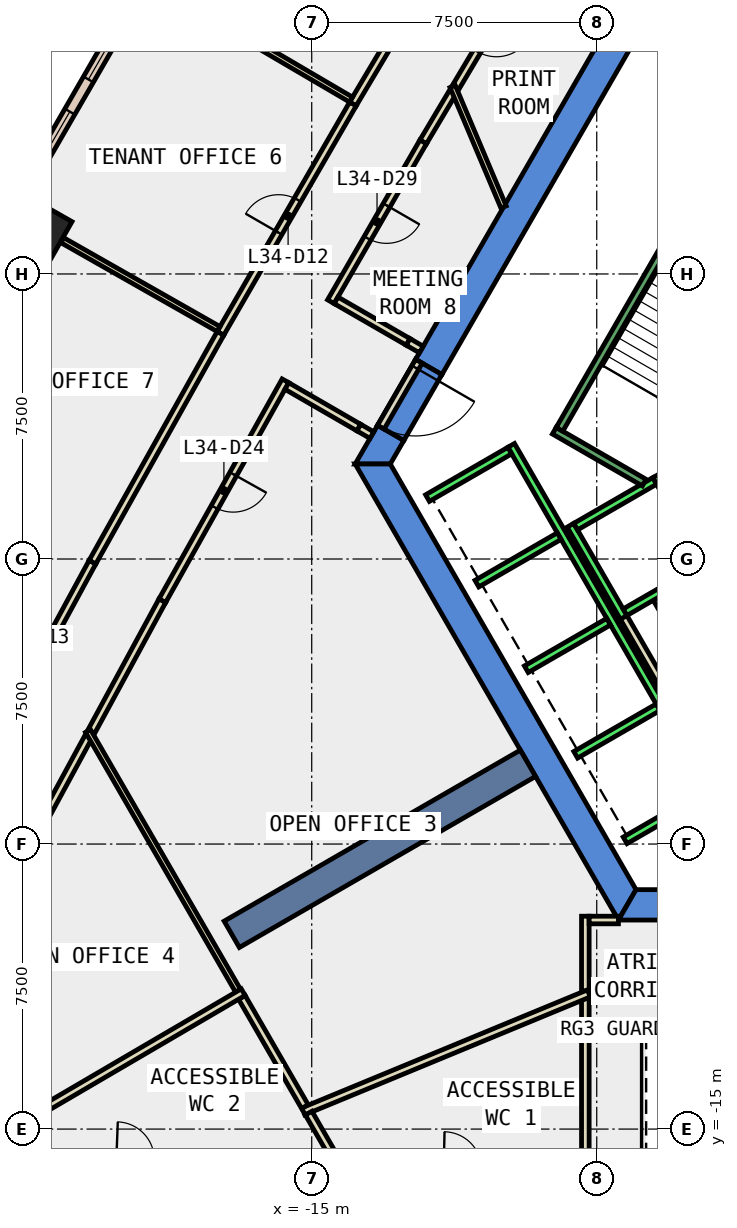
"""IFC4 building model, lengths in metres.
Left out: names, types, materials, properties, quantities, classifications, styles, units other than length and angle.
Written with IfcOpenShell. Run it as: python <this file> out.ifc"""

import sys

from ifc_helpers import new_model, si_unit, direction, frame, frame_2d, origin, origin_2d, place, context, subcontext, project, spatial, polyline, rectangle, outline, extrude, element, fill, save


model = new_model("IFC4")
c1 = context("Model", 3, precision=1e-05, world=origin(), true_north=direction((0.0, 1.0)))
c2 = subcontext(c1, "Body", "Model", "MODEL_VIEW")
j1 = project(units=[si_unit("LENGTHUNIT", "METRE"), si_unit("PLANEANGLEUNIT", "RADIAN")], contexts=[c1])
p1 = place(None, origin())
s1 = spatial("IfcSite", under=j1, at=p1, CompositionType="ELEMENT")
p2 = place(p1, origin())
s2 = spatial("IfcBuilding", under=s1, at=p2, CompositionType="ELEMENT")
p3 = place(p2, frame((0.0, 0.0, 155.0)))
s3 = spatial("IfcBuildingStorey", under=s2, at=p3, CompositionType="ELEMENT", Elevation=155.0)
p4 = place(p3, frame((-22.232, 8.769, -0.4), z_axis=(0.0, 0.0, 1.0), x_axis=(0.49401774245, 0.869451821635, 0.0)))
e1 = element("IfcColumn", 1, at=p4, inside=s3, PredefinedType="COLUMN", context=c2, shape_type="SweptSolid", body=[
    extrude(rectangle(XDim=1.1, YDim=1.5, at=origin_2d()), origin(), (0.0, 0.0, 1.0), 4.2),
])
p5 = place(p3, frame((0.0, 0.0, -0.4)))
e2 = element("IfcWall", 2, at=p5, inside=s3, PredefinedType="SHEAR", context=c2, shape_type="SweptSolid", body=[
    extrude(outline(polyline([(-12.267, 5.252), (-11.575, 4.852), (-6.466, 13.7), (-6.928, 14.5), (-12.267, 5.252)])), origin(), (0.0, 0.0, 1.0), 4.2),
])
p6 = place(p3, frame((0.0, 0.0, -0.4)))
e3 = element("IfcWall", 3, at=p6, inside=s3, PredefinedType="SHEAR", context=c2, shape_type="SweptSolid", body=[
    extrude(outline(polyline([(-12.575, 3.12), (-13.267, 3.52), (-13.856, 2.5), (-12.933, 2.5), (-12.575, 3.12)])), origin(), (0.0, 0.0, 1.0), 4.2),
])
p7 = place(p3, frame((0.0, 0.0, 3.6)))
e4 = element("IfcWall", 4, at=p7, inside=s3, PredefinedType="SHEAR", context=c2, shape_type="SweptSolid", body=[
    extrude(outline(polyline([(-13.267, 3.52), (-12.575, 3.12), (-11.575, 4.852), (-12.267, 5.252), (-13.267, 3.52)])), origin(), (0.0, 0.0, 1.0), 0.2),
])
p8 = place(p3, frame((0.0, 0.0, -0.4)))
e5 = element("IfcWall", 5, at=p8, inside=s3, PredefinedType="SHEAR", context=c2, shape_type="SweptSolid", body=[
    extrude(outline(polyline([(-13.856, 2.5), (-6.928, -9.5), (-6.466, -8.7), (-12.933, 2.5), (-13.856, 2.5)])), origin(), (0.0, 0.0, 1.0), 4.2),
])
p9 = place(p3, frame((0.0, 0.0, -0.4)))
e6 = element("IfcWall", 6, at=p9, inside=s3, PredefinedType="SHEAR", context=c2, shape_type="SweptSolid", body=[
    extrude(outline(polyline([(3.75, -9.5), (3.75, -8.7), (-6.466, -8.7), (-6.928, -9.5), (3.75, -9.5)])), origin(), (0.0, 0.0, 1.0), 4.2),
])
p10 = place(p3, frame((-9.31, -5.375, -0.4), z_axis=(0.0, 0.0, 1.0), x_axis=(-0.866017533419, -0.500013631625, 0.0)))
e7 = element("IfcWall", 7, at=p10, inside=s3, PredefinedType="SHEAR", context=c2, shape_type="SweptSolid", body=[
    extrude(rectangle(XDim=9.0, YDim=0.8, at=frame_2d((4.5, 0.0))), origin(), (0.0, 0.0, 1.0), 4.2),
])
p11 = place(p3, frame((-19.631, 14.774, 0.0), z_axis=(0.0, 0.0, 1.0), x_axis=(-0.500061823953, -0.865989706766, 0.0)))
e8 = element("IfcWall", 8, at=p11, inside=s3, PredefinedType="STANDARD", context=c2, shape_type="SweptSolid", body=[
    extrude(rectangle(XDim=5.957, YDim=0.3, at=frame_2d((2.979, 0.0))), origin(), (0.0, 0.0, 1.0), 3.8),
])
p12 = place(p11, frame((0.489, 0.0, 0.9)))
e9 = element("IfcOpeningElement", 9, at=p12, cuts=e8, PredefinedType="OPENING", context=c2, shape_type="SweptSolid", body=[
    extrude(rectangle(XDim=2.0, YDim=2.6, at=frame_2d((1.0, 1.3))), frame((0.0, 0.16, 0.0), z_axis=(0.0, -1.0, 0.0), x_axis=(1.0, 0.0, 0.0)), (0.0, 0.0, 1.0), 0.32),
])
p13 = place(p11, frame((3.468, 0.0, 0.9)))
e10 = element("IfcOpeningElement", 10, at=p13, cuts=e8, PredefinedType="OPENING", context=c2, shape_type="SweptSolid", body=[
    extrude(rectangle(XDim=2.0, YDim=2.6, at=frame_2d((1.0, 1.3))), frame((0.0, 0.16, 0.0), z_axis=(0.0, -1.0, 0.0), x_axis=(1.0, 0.0, 0.0)), (0.0, 0.0, 1.0), 0.32),
])
p14 = place(p3, frame((-9.574, 15.164, 0.0), z_axis=(0.0, 0.0, 1.0), x_axis=(-0.511482522046, -0.859293680671, 0.0)))
e11 = element("IfcWall", 11, at=p14, inside=s3, PredefinedType="PARTITIONING", context=c2, shape_type="SweptSolid", body=[
    extrude(rectangle(XDim=3.208, YDim=0.2, at=frame_2d((1.604, 0.0))), origin(), (0.0, 0.0, 1.0), 3.8),
])
p15 = place(p14, frame((1.104, 0.0, 0.0)))
e12 = element("IfcOpeningElement", 12, at=p15, cuts=e11, PredefinedType="OPENING", context=c2, shape_type="SweptSolid", body=[
    extrude(rectangle(XDim=1.0, YDim=2.1, at=frame_2d((0.5, 1.05))), frame((0.0, 0.11, 0.0), z_axis=(0.0, -1.0, 0.0), x_axis=(1.0, 0.0, 0.0)), (0.0, 0.0, 1.0), 0.22),
])
p16 = place(p3, frame((-11.291, 12.278, 0.0), z_axis=(0.0, 0.0, 1.0), x_axis=(-0.511628198266, -0.859206952217, 0.0)))
e13 = element("IfcWall", 13, at=p16, inside=s3, PredefinedType="PARTITIONING", context=c2, shape_type="SweptSolid", body=[
    extrude(rectangle(XDim=1.517, YDim=0.2, at=frame_2d((0.758, 0.0))), origin(), (0.0, 0.0, 1.0), 3.8),
])
p17 = place(p3, frame((-12.067, 10.975, 0.0), z_axis=(0.0, 0.0, 1.0), x_axis=(-0.500215616273, -0.865900881878, 0.0)))
e14 = element("IfcWall", 14, at=p17, inside=s3, PredefinedType="PARTITIONING", context=c2, shape_type="SweptSolid", body=[
    extrude(rectangle(XDim=4.856, YDim=0.2, at=frame_2d((2.428, 0.0))), origin(), (0.0, 0.0, 1.0), 3.8),
])
p18 = place(p17, frame((1.928, 0.0, 0.0)))
e15 = element("IfcOpeningElement", 15, at=p18, cuts=e14, PredefinedType="OPENING", context=c2, shape_type="SweptSolid", body=[
    extrude(rectangle(XDim=1.0, YDim=2.1, at=frame_2d((0.5, 1.05))), frame((0.0, 0.11, 0.0), z_axis=(0.0, -1.0, 0.0), x_axis=(1.0, 0.0, 0.0)), (0.0, 0.0, 1.0), 0.22),
])
p19 = place(p3, frame((-14.359, 6.806, 0.0), z_axis=(0.0, 0.0, 1.0), x_axis=(0.866155875717, -0.499773947861, 0.0)))
e16 = element("IfcWall", 16, at=p19, inside=s3, PredefinedType="PARTITIONING", context=c2, shape_type="SweptSolid", body=[
    extrude(rectangle(XDim=2.189, YDim=0.2, at=frame_2d((1.094, 0.0))), origin(), (0.0, 0.0, 1.0), 3.8),
])
p20 = place(p3, frame((-18.93, -1.095, 0.0), z_axis=(0.0, 0.0, 1.0), x_axis=(-0.476854303058, -0.878982351162, 0.0)))
e17 = element("IfcWall", 17, at=p20, inside=s3, PredefinedType="PARTITIONING", context=c2, shape_type="SweptSolid", body=[
    extrude(rectangle(XDim=3.924, YDim=0.2, at=frame_2d((1.962, 0.0))), origin(), (0.0, 0.0, 1.0), 3.8),
])
p21 = place(p3, frame((-13.417, 3.26, 0.0), z_axis=(0.0, 0.0, 1.0), x_axis=(-0.866398669086, 0.499352927503, 0.0)))
e18 = element("IfcWall", 18, at=p21, inside=s3, PredefinedType="PARTITIONING", context=c2, shape_type="SweptSolid", body=[
    extrude(rectangle(XDim=0.4, YDim=0.2, at=frame_2d((0.2, 0.0))), origin(), (0.0, 0.0, 1.0), 2.4),
])
p22 = place(p3, frame((-15.692, 4.689, 0.0), z_axis=(0.0, 0.0, 1.0), x_axis=(-0.48849233301, -0.872568186786, 0.0)))
e19 = element("IfcWall", 19, at=p22, inside=s3, PredefinedType="PARTITIONING", context=c2, shape_type="SweptSolid", body=[
    extrude(rectangle(XDim=6.629, YDim=0.2, at=frame_2d((3.314, 0.0))), origin(), (0.0, 0.0, 1.0), 3.8),
])
p23 = place(p22, frame((2.814, 0.0, 0.0)))
e20 = element("IfcOpeningElement", 20, at=p23, cuts=e19, PredefinedType="OPENING", context=c2, shape_type="SweptSolid", body=[
    extrude(rectangle(XDim=1.0, YDim=2.1, at=frame_2d((0.5, 1.05))), frame((0.0, 0.11, 0.0), z_axis=(0.0, -1.0, 0.0), x_axis=(1.0, 0.0, 0.0)), (0.0, 0.0, 1.0), 0.22),
])
p24 = place(p3, frame((-20.873, -4.676, 0.0), z_axis=(0.0, 0.0, 1.0), x_axis=(-0.476781985736, -0.879021579984, 0.0)))
e21 = element("IfcWall", 21, at=p24, inside=s3, PredefinedType="PARTITIONING", context=c2, shape_type="SweptSolid", body=[
    extrude(rectangle(XDim=2.869, YDim=0.2, at=frame_2d((1.435, 0.0))), origin(), (0.0, 0.0, 1.0), 3.8),
])
p25 = place(p3, frame((-13.917, 11.973, 0.0), z_axis=(0.0, 0.0, 1.0), x_axis=(0.511455840413, 0.859309561978, 0.0)))
e22 = element("IfcWall", 22, at=p25, inside=s3, PredefinedType="PARTITIONING", context=c2, shape_type="SweptSolid", body=[
    extrude(rectangle(XDim=7.047, YDim=0.2, at=frame_2d((3.523, 0.0))), origin(), (0.0, 0.0, 1.0), 3.8),
])
p26 = place(p25, frame((3.023, 0.0, 0.0)))
e23 = element("IfcOpeningElement", 23, at=p26, cuts=e22, PredefinedType="OPENING", context=c2, shape_type="SweptSolid", body=[
    extrude(rectangle(XDim=1.0, YDim=2.1, at=frame_2d((0.5, 1.05))), frame((0.0, 0.11, 0.0), z_axis=(0.0, -1.0, 0.0), x_axis=(1.0, 0.0, 0.0)), (0.0, 0.0, 1.0), 0.22),
])
p27 = place(p3, frame((-17.402, 5.936, 0.0), z_axis=(0.0, 0.0, 1.0), x_axis=(0.500135788517, 0.865946992052, 0.0)))
e24 = element("IfcWall", 24, at=p27, inside=s3, PredefinedType="PARTITIONING", context=c2, shape_type="SweptSolid", body=[
    extrude(rectangle(XDim=6.97, YDim=0.2, at=frame_2d((3.485, 0.0))), origin(), (0.0, 0.0, 1.0), 3.8),
])
p28 = place(p27, frame((3.06, 0.0, 0.0)))
e25 = element("IfcOpeningElement", 25, at=p28, cuts=e24, PredefinedType="OPENING", context=c2, shape_type="SweptSolid", body=[
    extrude(rectangle(XDim=1.0, YDim=2.1, at=frame_2d((0.5, 1.05))), frame((0.0, 0.11, 0.0), z_axis=(0.0, -1.0, 0.0), x_axis=(1.0, 0.0, 0.0)), (0.0, 0.0, 1.0), 0.22),
])
p29 = place(p3, frame((-24.13, -6.275, 0.0), z_axis=(0.0, 0.0, 1.0), x_axis=(0.476981750532, 0.878913198023, 0.0)))
e26 = element("IfcWall", 26, at=p29, inside=s3, PredefinedType="PARTITIONING", context=c2, shape_type="SweptSolid", body=[
    extrude(rectangle(XDim=7.046, YDim=0.2, at=frame_2d((3.523, 0.0))), origin(), (0.0, 0.0, 1.0), 3.8),
])
p30 = place(p29, frame((3.023, 0.0, 0.0)))
e27 = element("IfcOpeningElement", 27, at=p30, cuts=e26, PredefinedType="OPENING", context=c2, shape_type="SweptSolid", body=[
    extrude(rectangle(XDim=1.0, YDim=2.1, at=frame_2d((0.5, 1.05))), frame((0.0, 0.11, 0.0), z_axis=(0.0, -1.0, 0.0), x_axis=(1.0, 0.0, 0.0)), (0.0, 0.0, 1.0), 0.22),
])
p31 = place(p3, frame((-20.769, -0.082, 0.0), z_axis=(0.0, 0.0, 1.0), x_axis=(0.488387759141, 0.872626722443, 0.0)))
e28 = element("IfcWall", 28, at=p31, inside=s3, PredefinedType="PARTITIONING", context=c2, shape_type="SweptSolid", body=[
    extrude(rectangle(XDim=6.896, YDim=0.2, at=frame_2d((3.448, 0.0))), origin(), (0.0, 0.0, 1.0), 3.8),
])
p32 = place(p3, frame((-5.126, -2.422, 0.0), z_axis=(0.0, 0.0, 1.0), x_axis=(-0.500062241894, 0.865989465428, 0.0)))
e29 = element("IfcWall", 29, at=p32, inside=s3, PredefinedType="PARTITIONING", context=c2, shape_type="SweptSolid", body=[
    extrude(rectangle(XDim=1.7, YDim=0.2, at=frame_2d((0.85, 0.0))), origin(), (0.0, 0.0, 1.0), 3.8),
])
p33 = place(p3, frame((-5.492, -3.788, 0.0), z_axis=(0.0, 0.0, 1.0), x_axis=(-0.500008949224, 0.866020236886, 0.0)))
e30 = element("IfcWall", 30, at=p33, inside=s3, PredefinedType="PARTITIONING", context=c2, shape_type="SweptSolid", body=[
    extrude(rectangle(XDim=2.68, YDim=0.2, at=frame_2d((1.34, 0.0))), origin(), (0.0, 0.0, 1.0), 3.8),
])
p34 = place(p3, frame((-9.952, 9.262, 0.0), z_axis=(0.0, 0.0, 1.0), x_axis=(-0.38905491579, 0.921214563769, 0.0)))
e31 = element("IfcWall", 31, at=p34, inside=s3, PredefinedType="PARTITIONING", context=c2, shape_type="SweptSolid", body=[
    extrude(rectangle(XDim=3.445, YDim=0.15, at=frame_2d((1.722, 0.0))), origin(), (0.0, 0.0, 1.0), 3.8),
])
p35 = place(p3, frame((-7.8, -11.368, 0.0), z_axis=(0.0, 0.0, 1.0), x_axis=(0.0, 1.0, 0.0)))
e32 = element("IfcWall", 32, at=p35, inside=s3, PredefinedType="PARTITIONING", context=c2, shape_type="SweptSolid", body=[
    extrude(rectangle(XDim=1.969, YDim=0.2, at=frame_2d((0.984, 0.0))), origin(), (0.0, 0.0, 1.0), 3.8),
])
p36 = place(p3, frame((-7.7, -9.499, 0.0), z_axis=(0.0, 0.0, 1.0), x_axis=(1.0, 0.0, 0.0)))
e33 = element("IfcWall", 33, at=p36, inside=s3, PredefinedType="PARTITIONING", context=c2, shape_type="SweptSolid", body=[
    extrude(rectangle(XDim=0.771, YDim=0.2, at=frame_2d((0.385, 0.0))), origin(), (0.0, 0.0, 1.0), 3.8),
])
p37 = place(p3, frame((-7.8, -16.055, 0.0), z_axis=(0.0, 0.0, 1.0), x_axis=(0.0, 1.0, 0.0)))
e34 = element("IfcWall", 34, at=p37, inside=s3, PredefinedType="PARTITIONING", context=c2, shape_type="SweptSolid", body=[
    extrude(rectangle(XDim=4.487, YDim=0.2, at=frame_2d((2.243, 0.0))), origin(), (0.0, 0.0, 1.0), 3.8),
])
p38 = place(p3, frame((-7.708, -11.43, 0.0), z_axis=(0.0, 0.0, 1.0), x_axis=(-0.924285151797, -0.381702709144, 0.0)))
e35 = element("IfcWall", 35, at=p38, inside=s3, PredefinedType="PARTITIONING", context=c2, shape_type="SweptSolid", body=[
    extrude(rectangle(XDim=8.129, YDim=0.2, at=frame_2d((4.065, 0.0))), origin(), (0.0, 0.0, 1.0), 3.8),
])
p39 = place(p3, frame((-16.939, -11.36, 0.0), z_axis=(0.0, 0.0, 1.0), x_axis=(-0.500053473428, 0.865994528685, 0.0)))
e36 = element("IfcWall", 36, at=p39, inside=s3, PredefinedType="PARTITIONING", context=c2, shape_type="SweptSolid", body=[
    extrude(rectangle(XDim=7.895, YDim=0.15, at=frame_2d((3.948, 0.0))), origin(), (0.0, 0.0, 1.0), 3.8),
])
p40 = place(p3, frame((-15.18, -14.408, 0.0), z_axis=(0.0, 0.0, 1.0), x_axis=(-0.499968694491, 0.866043477274, 0.0)))
e37 = element("IfcWall", 37, at=p40, inside=s3, PredefinedType="PARTITIONING", context=c2, shape_type="SweptSolid", body=[
    extrude(rectangle(XDim=3.319, YDim=0.2, at=frame_2d((1.659, 0.0))), origin(), (0.0, 0.0, 1.0), 3.8),
])
p41 = place(p3, frame((-14.256, -16.009, 0.0), z_axis=(0.0, 0.0, 1.0), x_axis=(-0.499786551025, 0.86614860354, 0.0)))
e38 = element("IfcWall", 38, at=p41, inside=s3, PredefinedType="PARTITIONING", context=c2, shape_type="SweptSolid", body=[
    extrude(rectangle(XDim=1.649, YDim=0.2, at=frame_2d((0.824, 0.0))), origin(), (0.0, 0.0, 1.0), 3.8),
])
p42 = place(p3, frame((-16.803, -11.397, 0.0), z_axis=(0.0, 0.0, 1.0), x_axis=(-0.863203941699, -0.504855380318, 0.0)))
e39 = element("IfcWall", 39, at=p42, inside=s3, PredefinedType="PARTITIONING", context=c2, shape_type="SweptSolid", body=[
    extrude(rectangle(XDim=8.232, YDim=0.2, at=frame_2d((4.116, 0.0))), origin(), (0.0, 0.0, 1.0), 3.8),
])
p43 = place(p3, frame((-13.965, 12.088, 0.0), z_axis=(0.0, 0.0, 1.0), x_axis=(-0.862617990649, 0.50585591052, 0.0)))
e40 = element("IfcWall", 40, at=p43, inside=s3, PredefinedType="PARTITIONING", context=c2, shape_type="SweptSolid", body=[
    extrude(rectangle(XDim=4.731, YDim=0.15, at=frame_2d((2.365, 0.0))), origin(), (0.0, 0.0, 1.0), 3.8),
])
p44 = place(p3, frame((-17.451, 6.051, 0.0), z_axis=(0.0, 0.0, 1.0), x_axis=(-0.869409691741, 0.494091882049, 0.0)))
e41 = element("IfcWall", 41, at=p44, inside=s3, PredefinedType="PARTITIONING", context=c2, shape_type="SweptSolid", body=[
    extrude(rectangle(XDim=4.73, YDim=0.15, at=frame_2d((2.365, 0.0))), origin(), (0.0, 0.0, 1.0), 3.8),
])
p45 = place(p3, frame((-12.18, 5.202, 0.0), z_axis=(0.0, 0.0, 1.0), x_axis=(-0.50002537861, -0.866010750942, 0.0)))
e42 = element("IfcWall", 42, at=p45, inside=s3, PredefinedType="PARTITIONING", context=c2, shape_type="SweptSolid", body=[
    extrude(rectangle(XDim=2.0, YDim=0.2, at=frame_2d((1.0, 0.0))), origin(), (0.0, 0.0, 1.0), 2.4),
])
p46 = place(p45, frame((0.19, 0.0, 0.0)))
e43 = element("IfcOpeningElement", 43, at=p46, cuts=e42, PredefinedType="OPENING", context=c2, shape_type="SweptSolid", body=[
    extrude(rectangle(XDim=1.8, YDim=2.1, at=frame_2d((0.9, 1.05))), frame((0.0, 0.11, 0.0), z_axis=(0.0, -1.0, 0.0), x_axis=(1.0, 0.0, 0.0)), (0.0, 0.0, 1.0), 0.22),
])
p47 = place(p3, frame((-12.463, 5.712, 0.0), z_axis=(0.0, 0.0, 1.0), x_axis=(0.865788603161, -0.500409926597, 0.0)))
e44 = element("IfcWall", 44, at=p47, inside=s3, PredefinedType="PARTITIONING", context=c2, shape_type="SweptSolid", body=[
    extrude(rectangle(XDim=0.4, YDim=0.2, at=frame_2d((0.2, 0.0))), origin(), (0.0, 0.0, 1.0), 2.4),
])
p48 = place(p3, frame((-13.764, 3.46, 0.0), z_axis=(0.0, 0.0, 1.0), x_axis=(-0.865872609263, 0.500264554538, 0.0)))
e45 = element("IfcWall", 45, at=p48, inside=s3, PredefinedType="PARTITIONING", context=c2, shape_type="SweptSolid", body=[
    extrude(rectangle(XDim=2.183, YDim=0.2, at=frame_2d((1.091, 0.0))), origin(), (0.0, 0.0, 1.0), 3.8),
])
p49 = place(p3, frame((-5.94, 2.188, 0.0), z_axis=(0.0, 0.0, 1.0), x_axis=(0.49994636267, -0.866056369097, 0.0)))
e46 = element("IfcWall", 46, at=p49, inside=s3, PredefinedType="STANDARD", context=c2, shape_type="SweptSolid", body=[
    extrude(rectangle(XDim=2.8, YDim=0.2, at=frame_2d((1.4, 0.0))), origin(), (0.0, 0.0, 1.0), 3.8),
])
p50 = place(p49, frame((1.225, 0.0, 0.0)))
e47 = element("IfcOpeningElement", 47, at=p50, cuts=e46, PredefinedType="OPENING", context=c2, shape_type="SweptSolid", body=[
    extrude(rectangle(XDim=1.1, YDim=2.1, at=frame_2d((0.55, 1.05))), frame((0.0, 0.11, 0.0), z_axis=(0.0, -1.0, 0.0), x_axis=(1.0, 0.0, 0.0)), (0.0, 0.0, 1.0), 0.22),
])
p51 = place(p3, frame((-8.192, 0.888, 0.0), z_axis=(0.0, 0.0, 1.0), x_axis=(0.49994636267, -0.866056369097, 0.0)))
e48 = element("IfcWall", 48, at=p51, inside=s3, PredefinedType="STANDARD", context=c2, shape_type="SweptSolid", body=[
    extrude(rectangle(XDim=2.8, YDim=0.2, at=frame_2d((1.4, 0.0))), origin(), (0.0, 0.0, 1.0), 3.8),
])
for number, where, z_axis, x_axis in (
    (49, (-5.977, 2.052, 0.0), (0.0, 0.0, 1.0), (-0.866, -0.5, 0.0)),
    (50, (-4.677, -0.2, 0.0), (0.0, 0.0, 1.0), (-0.866, -0.5, 0.0)),
):
    element("IfcWall", number, at=place(p3, frame(where, z_axis=z_axis, x_axis=x_axis)), inside=s3, PredefinedType="STANDARD", context=c2, shape_type="SweptSolid", body=[
        extrude(rectangle(XDim=2.399, YDim=0.2, at=frame_2d((1.2, 0.0))), origin(), (0.0, 0.0, 1.0), 3.8),
    ])
p52 = place(p3, frame((-9.751, 2.99, 0.0), z_axis=(0.0, 0.0, 1.0), x_axis=(0.50000090737, -0.866024879913, 0.0)))
e51 = element("IfcWall", 51, at=p52, inside=s3, PredefinedType="STANDARD", context=c2, shape_type="SweptSolid", body=[
    extrude(rectangle(XDim=10.6, YDim=0.2, at=frame_2d((5.3, 0.0))), origin(), (0.0, 0.0, 1.0), 3.8),
])
p53 = place(p3, frame((-9.788, 2.853, 0.0), z_axis=(0.0, 0.0, 1.0), x_axis=(-0.865998541277, -0.500046524342, 0.0)))
e52 = element("IfcWall", 52, at=p53, inside=s3, PredefinedType="STANDARD", context=c2, shape_type="SweptSolid", body=[
    extrude(rectangle(XDim=2.5, YDim=0.2, at=frame_2d((1.25, 0.0))), origin(), (0.0, 0.0, 1.0), 3.8),
])
for number, where, z_axis, x_axis in (
    (53, (-8.488, 0.602, 0.0), (0.0, 0.0, 1.0), (-0.866, -0.5, 0.0)),
    (54, (-7.188, -1.65, 0.0), (0.0, 0.0, 1.0), (-0.866, -0.5, 0.0)),
    (55, (-5.888, -3.902, 0.0), (0.0, 0.0, 1.0), (-0.866, -0.5, 0.0)),
    (56, (-4.588, -6.153, 0.0), (0.0, 0.0, 1.0), (-0.866, -0.5, 0.0)),
):
    element("IfcWall", number, at=place(p3, frame(where, z_axis=z_axis, x_axis=x_axis)), inside=s3, PredefinedType="STANDARD", context=c2, shape_type="SweptSolid", body=[
        extrude(rectangle(XDim=2.5, YDim=0.2, at=frame_2d((1.25, 0.0))), origin(), (0.0, 0.0, 1.0), 3.8),
    ])
p54 = place(p3, frame((-6.25, 2.01, 0.0), z_axis=(0.0, 0.0, 1.0), x_axis=(-0.86611865017, 0.499838457731, 0.0)))
e57 = element("IfcWall", 57, at=p54, inside=s3, PredefinedType="STANDARD", context=c2, shape_type="SweptSolid", body=[
    extrude(rectangle(XDim=2.733, YDim=0.2, at=frame_2d((1.366, 0.0))), origin(), (0.0, 0.0, 1.0), 3.8),
])
p55 = place(p3, frame((-5.03, 9.388, 0.0), z_axis=(0.0, 0.0, 1.0), x_axis=(-0.499978703459, -0.866037698999, 0.0)))
e58 = element("IfcWall", 58, at=p55, inside=s3, PredefinedType="STANDARD", context=c2, shape_type="SweptSolid", body=[
    extrude(rectangle(XDim=6.9, YDim=0.2, at=frame_2d((3.45, 0.0))), origin(), (0.0, 0.0, 1.0), 3.8),
])
p56 = place(p12, origin())
e59 = element("IfcWindow", 59, at=p56, inside=s3, PartitioningType="SINGLE_PANEL", PredefinedType="WINDOW", context=c2, shape_type="SweptSolid", body=[
    extrude(rectangle(XDim=2.0, YDim=2.6, at=frame_2d((1.0, 1.3))), frame((0.0, 0.03, 0.0), z_axis=(0.0, -1.0, 0.0), x_axis=(1.0, 0.0, 0.0)), (0.0, 0.0, 1.0), 0.06),
])
fill(e9, e59)
p57 = place(p13, origin())
e60 = element("IfcWindow", 60, at=p57, inside=s3, PartitioningType="SINGLE_PANEL", PredefinedType="WINDOW", context=c2, shape_type="SweptSolid", body=[
    extrude(rectangle(XDim=2.0, YDim=2.6, at=frame_2d((1.0, 1.3))), frame((0.0, 0.03, 0.0), z_axis=(0.0, -1.0, 0.0), x_axis=(1.0, 0.0, 0.0)), (0.0, 0.0, 1.0), 0.06),
])
fill(e10, e60)
p58 = place(p28, origin())
e61 = element("IfcDoor", 61, at=p58, inside=s3, OperationType="SINGLE_SWING_LEFT", PredefinedType="DOOR", context=c2, shape_type="SweptSolid", body=[
    extrude(rectangle(XDim=1.0, YDim=2.1, at=frame_2d((0.5, 1.05))), frame((0.0, 0.025, 0.0), z_axis=(0.0, -1.0, 0.0), x_axis=(1.0, 0.0, 0.0)), (0.0, 0.0, 1.0), 0.05),
])
fill(e25, e61)
p59 = place(p23, origin())
e62 = element("IfcDoor", 62, at=p59, inside=s3, OperationType="SINGLE_SWING_LEFT", PredefinedType="DOOR", context=c2, shape_type="SweptSolid", body=[
    extrude(rectangle(XDim=1.0, YDim=2.1, at=frame_2d((0.5, 1.05))), frame((0.0, 0.025, 0.0), z_axis=(0.0, -1.0, 0.0), x_axis=(1.0, 0.0, 0.0)), (0.0, 0.0, 1.0), 0.05),
])
fill(e20, e62)
p60 = place(p18, origin())
e63 = element("IfcDoor", 63, at=p60, inside=s3, OperationType="SINGLE_SWING_LEFT", PredefinedType="DOOR", context=c2, shape_type="SweptSolid", body=[
    extrude(rectangle(XDim=1.0, YDim=2.1, at=frame_2d((0.5, 1.05))), frame((0.0, 0.025, 0.0), z_axis=(0.0, -1.0, 0.0), x_axis=(1.0, 0.0, 0.0)), (0.0, 0.0, 1.0), 0.05),
])
fill(e15, e63)
p61 = place(p46, origin())
e64 = element("IfcDoor", 64, at=p61, inside=s3, OperationType="DOUBLE_DOOR_SINGLE_SWING", PredefinedType="DOOR", context=c2, shape_type="SweptSolid", body=[
    extrude(rectangle(XDim=1.8, YDim=2.1, at=frame_2d((0.9, 1.05))), frame((0.0, 0.025, 0.0), z_axis=(0.0, -1.0, 0.0), x_axis=(1.0, 0.0, 0.0)), (0.0, 0.0, 1.0), 0.05),
])
fill(e43, e64)
save(model, sys.argv[1])
